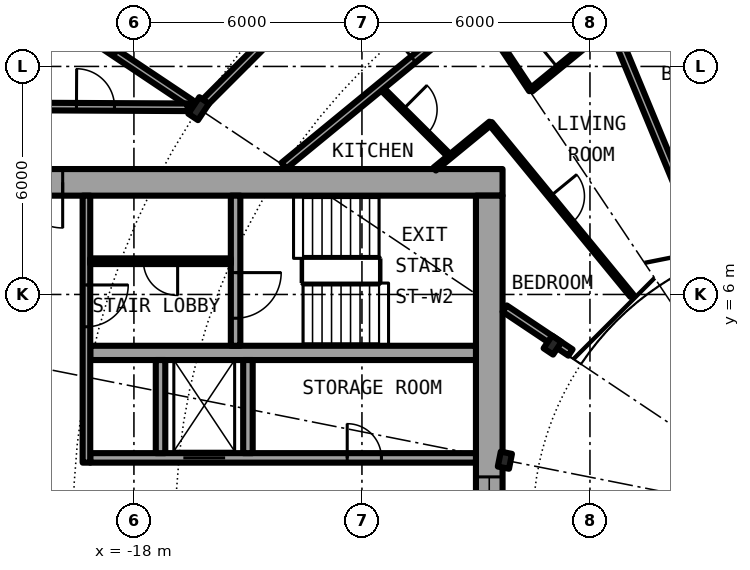
"""IFC4 building model, lengths in metres.
Left out: names, types, materials, properties, quantities, classifications, styles, units other than length and angle.
Written with IfcOpenShell. Run it as: python <this file> out.ifc"""

import sys

from ifc_helpers import new_model, si_unit, direction, frame, frame_2d, origin, origin_2d, place, context, subcontext, project, spatial, rectangle, i_section, extrude, element, fill, save


model = new_model("IFC4")
c1 = context("Model", 3, precision=1e-05, world=origin(), true_north=direction((0.0, 1.0)))
c2 = subcontext(c1, "Body", "Model", "MODEL_VIEW")
j1 = project(units=[si_unit("LENGTHUNIT", "METRE"), si_unit("PLANEANGLEUNIT", "RADIAN")], contexts=[c1])
p1 = place(None, origin())
s1 = spatial("IfcSite", under=j1, at=p1, CompositionType="ELEMENT")
p2 = place(p1, origin())
s2 = spatial("IfcBuilding", under=s1, at=p2, CompositionType="ELEMENT")
p3 = place(p2, frame((0.0, 0.0, 72.75)))
s3 = spatial("IfcBuildingStorey", under=s2, at=p3, CompositionType="ELEMENT", Elevation=72.75)
p4 = place(p3, frame((-16.297, 10.889, 0.0), z_axis=(0.0, 0.0, 1.0), x_axis=(-0.831469612303, 0.55557023302, 0.0)))
e1 = element("IfcColumn", 1, at=p4, inside=s3, PredefinedType="COLUMN", context=c2, shape_type="SweptSolid", body=[
    extrude(i_section(OverallWidth=0.306, OverallDepth=0.524, WebThickness=0.021, FlangeThickness=0.04, FilletRadius=0.027, at=origin_2d()), origin(), (0.0, 0.0, 1.0), 3.05),
])
for number, where, z_axis, x_axis in (
    (2, (-6.984, 4.667, 0.0), (0.0, 0.0, 1.0), (-0.831, 0.556, 0.0)),
    (3, (-8.239, 1.639, 0.0), (0.0, 0.0, 1.0), (-0.981, 0.195, 0.0)),
):
    element("IfcColumn", number, at=place(p3, frame(where, z_axis=z_axis, x_axis=x_axis)), inside=s3, PredefinedType="COLUMN", context=c2, shape_type="SweptSolid", body=[
        extrude(i_section(OverallWidth=0.3, OverallDepth=0.4, WebThickness=0.013, FlangeThickness=0.024, FilletRadius=0.027, at=origin_2d()), origin(), (0.0, 0.0, 1.0), 3.05),
    ])
p5 = place(p3, frame((-8.3, 8.95, 0.0), z_axis=(0.0, 0.0, 1.0), x_axis=(-1.0, 0.0, 0.0)))
e4 = element("IfcWall", 4, at=p5, inside=s3, PredefinedType="SHEAR", context=c2, shape_type="SweptSolid", body=[
    extrude(rectangle(XDim=14.0, YDim=0.7, at=frame_2d((7.0, 0.0))), origin(), (0.0, 0.0, 1.0), 3.05),
])
p6 = place(p5, frame((11.575, 0.0, 0.0)))
e5 = element("IfcOpeningElement", 5, at=p6, cuts=e4, PredefinedType="OPENING", context=c2, shape_type="SweptSolid", body=[
    extrude(rectangle(XDim=1.2, YDim=2.3, at=frame_2d((0.6, 1.15))), frame((0.0, 0.36, 0.0), z_axis=(0.0, -1.0, 0.0), x_axis=(1.0, 0.0, 0.0)), (0.0, 0.0, 1.0), 0.72),
])
p7 = place(p3, frame((-8.65, 8.6, 0.0), z_axis=(0.0, 0.0, 1.0), x_axis=(0.0, -1.0, 0.0)))
e6 = element("IfcWall", 6, at=p7, inside=s3, PredefinedType="SHEAR", context=c2, shape_type="SweptSolid", body=[
    extrude(rectangle(XDim=17.2, YDim=0.7, at=frame_2d((8.6, 0.0))), origin(), (0.0, 0.0, 1.0), 3.05),
])
p8 = place(p7, frame((7.4, 0.0, 0.1)))
e7 = element("IfcOpeningElement", 7, at=p8, cuts=e6, PredefinedType="OPENING", context=c2, shape_type="SweptSolid", body=[
    extrude(rectangle(XDim=2.4, YDim=2.2, at=frame_2d((1.2, 1.1))), frame((0.0, 0.36, 0.0), z_axis=(0.0, -1.0, 0.0), x_axis=(1.0, 0.0, 0.0)), (0.0, 0.0, 1.0), 0.72),
])
p9 = place(p3, frame((-19.15, 1.7, 0.0), z_axis=(0.0, 0.0, 1.0), x_axis=(1.0, 0.0, 0.0)))
e8 = element("IfcWall", 8, at=p9, inside=s3, PredefinedType="SHEAR", context=c2, shape_type="SweptSolid", body=[
    extrude(rectangle(XDim=10.15, YDim=0.25, at=frame_2d((5.075, 0.0))), origin(), (0.0, 0.0, 1.0), 3.05),
])
p10 = place(p9, frame((2.45, 0.0, 0.0)))
e9 = element("IfcOpeningElement", 9, at=p10, cuts=e8, PredefinedType="OPENING", context=c2, shape_type="SweptSolid", body=[
    extrude(rectangle(XDim=1.1, YDim=2.3, at=frame_2d((0.55, 1.15))), frame((0.0, 0.135, 0.0), z_axis=(0.0, -1.0, 0.0), x_axis=(1.0, 0.0, 0.0)), (0.0, 0.0, 1.0), 0.27),
])
p11 = place(p9, frame((6.762, 0.0, 0.0)))
e10 = element("IfcOpeningElement", 10, at=p11, cuts=e8, PredefinedType="OPENING", context=c2, shape_type="SweptSolid", body=[
    extrude(rectangle(XDim=0.9, YDim=2.3, at=frame_2d((0.45, 1.15))), frame((0.0, 0.135, 0.0), z_axis=(0.0, -1.0, 0.0), x_axis=(1.0, 0.0, 0.0)), (0.0, 0.0, 1.0), 0.27),
])
p12 = place(p3, frame((-9.0, 4.462, 0.0), z_axis=(0.0, 0.0, 1.0), x_axis=(-1.0, 0.0, 0.0)))
e11 = element("IfcWall", 11, at=p12, inside=s3, PredefinedType="SHEAR", context=c2, shape_type="SweptSolid", body=[
    extrude(rectangle(XDim=10.15, YDim=0.375, at=frame_2d((5.075, 0.0))), origin(), (0.0, 0.0, 1.0), 3.05),
])
p13 = place(p3, frame((-15.325, 8.6, 0.0), z_axis=(0.0, 0.0, 1.0), x_axis=(0.0, -1.0, 0.0)))
e12 = element("IfcWall", 12, at=p13, inside=s3, PredefinedType="SHEAR", context=c2, shape_type="SweptSolid", body=[
    extrude(rectangle(XDim=3.95, YDim=0.25, at=frame_2d((1.975, 0.0))), origin(), (0.0, 0.0, 1.0), 3.05),
])
p14 = place(p13, frame((2.025, 0.0, 0.0)))
e13 = element("IfcOpeningElement", 13, at=p14, cuts=e12, PredefinedType="OPENING", context=c2, shape_type="SweptSolid", body=[
    extrude(rectangle(XDim=1.2, YDim=2.3, at=frame_2d((0.6, 1.15))), frame((0.0, 0.135, 0.0), z_axis=(0.0, -1.0, 0.0), x_axis=(1.0, 0.0, 0.0)), (0.0, 0.0, 1.0), 0.27),
])
for number, where, z_axis, x_axis in (
    (14, (-15.0, 1.825, 0.0), (0.0, 0.0, 1.0), (0.0, 1.0, 0.0)),
    (15, (-17.3, 1.825, 0.0), (0.0, 0.0, 1.0), (0.0, 1.0, 0.0)),
):
    element("IfcWall", number, at=place(p3, frame(where, z_axis=z_axis, x_axis=x_axis)), inside=s3, PredefinedType="SOLIDWALL", context=c2, shape_type="SweptSolid", body=[
        extrude(rectangle(XDim=2.45, YDim=0.25, at=frame_2d((1.225, 0.0))), origin(), (0.0, 0.0, 1.0), 2.7),
    ])
p15 = place(p3, frame((-19.25, 8.6, 0.0), z_axis=(0.0, 0.0, 1.0), x_axis=(0.0, -1.0, 0.0)))
e16 = element("IfcWall", 16, at=p15, inside=s3, PredefinedType="SOLIDWALL", context=c2, shape_type="SweptSolid", body=[
    extrude(rectangle(XDim=7.025, YDim=0.2, at=frame_2d((3.513, 0.0))), origin(), (0.0, 0.0, 1.0), 2.7),
])
p16 = place(p15, frame((2.35, 0.0, 0.0)))
e17 = element("IfcOpeningElement", 17, at=p16, cuts=e16, PredefinedType="OPENING", context=c2, shape_type="SweptSolid", body=[
    extrude(rectangle(XDim=1.1, YDim=2.3, at=frame_2d((0.55, 1.15))), frame((0.0, 0.11, 0.0), z_axis=(0.0, -1.0, 0.0), x_axis=(1.0, 0.0, 0.0)), (0.0, 0.0, 1.0), 0.22),
])
p17 = place(p3, frame((-15.45, 6.875, 0.0), z_axis=(0.0, 0.0, 1.0), x_axis=(-1.0, 0.0, 0.0)))
e18 = element("IfcWall", 18, at=p17, inside=s3, PredefinedType="PARTITIONING", context=c2, shape_type="SweptSolid", body=[
    extrude(rectangle(XDim=3.7, YDim=0.15, at=frame_2d((1.85, 0.0))), origin(), (0.0, 0.0, 1.0), 2.7),
])
p18 = place(p17, frame((1.4, 0.0, 0.0)))
e19 = element("IfcOpeningElement", 19, at=p18, cuts=e18, PredefinedType="OPENING", context=c2, shape_type="SweptSolid", body=[
    extrude(rectangle(XDim=0.9, YDim=2.3, at=frame_2d((0.45, 1.15))), frame((0.0, 0.085, 0.0), z_axis=(0.0, -1.0, 0.0), x_axis=(1.0, 0.0, 0.0)), (0.0, 0.0, 1.0), 0.17),
])
p19 = place(p3, frame((-22.595, 15.098, 0.0), z_axis=(0.0, 0.0, 1.0), x_axis=(0.831382022135, -0.555701298605, 0.0)))
e20 = element("IfcWall", 20, at=p19, inside=s3, PredefinedType="PARTITIONING", context=c2, shape_type="SweptSolid", body=[
    extrude(rectangle(XDim=7.313, YDim=0.2, at=frame_2d((3.657, 0.0))), origin(), (0.0, 0.0, 1.0), 2.7),
])
p20 = place(p3, frame((-11.524, 11.464, 0.0), z_axis=(0.0, 0.0, 1.0), x_axis=(0.708796844581, -0.705412668665, 0.0)))
e21 = element("IfcWall", 21, at=p20, inside=s3, PredefinedType="PARTITIONING", context=c2, shape_type="SweptSolid", body=[
    extrude(rectangle(XDim=2.597, YDim=0.1, at=frame_2d((1.299, 0.0))), origin(), (0.0, 0.0, 1.0), 2.7),
])
p21 = place(p20, frame((0.849, 0.0, 0.0)))
e22 = element("IfcOpeningElement", 22, at=p21, cuts=e21, PredefinedType="OPENING", context=c2, shape_type="SweptSolid", body=[
    extrude(rectangle(XDim=0.9, YDim=2.3, at=frame_2d((0.45, 1.15))), frame((0.0, 0.06, 0.0), z_axis=(0.0, -1.0, 0.0), x_axis=(1.0, 0.0, 0.0)), (0.0, 0.0, 1.0), 0.12),
])
p22 = place(p3, frame((-8.996, 13.539, 0.0), z_axis=(0.0, 0.0, 1.0), x_axis=(0.553615197403, -0.83277260594, 0.0)))
e23 = element("IfcWall", 23, at=p22, inside=s3, PredefinedType="PARTITIONING", context=c2, shape_type="SweptSolid", body=[
    extrude(rectangle(XDim=2.597, YDim=0.1, at=frame_2d((1.299, 0.0))), origin(), (0.0, 0.0, 1.0), 2.7),
])
p23 = place(p3, frame((-8.62, 10.504, 0.0), z_axis=(0.0, 0.0, 1.0), x_axis=(0.634358693064, -0.773038840249, 0.0)))
e24 = element("IfcWall", 24, at=p23, inside=s3, PredefinedType="PARTITIONING", context=c2, shape_type="SweptSolid", body=[
    extrude(rectangle(XDim=5.868, YDim=0.1, at=frame_2d((2.934, 0.0))), origin(), (0.0, 0.0, 1.0), 2.7),
])
p24 = place(p23, frame((2.484, 0.0, 0.0)))
e25 = element("IfcOpeningElement", 25, at=p24, cuts=e24, PredefinedType="OPENING", context=c2, shape_type="SweptSolid", body=[
    extrude(rectangle(XDim=0.9, YDim=2.3, at=frame_2d((0.45, 1.15))), frame((0.0, 0.06, 0.0), z_axis=(0.0, -1.0, 0.0), x_axis=(1.0, 0.0, 0.0)), (0.0, 0.0, 1.0), 0.12),
])
p25 = place(p3, frame((-6.468, 15.614, 0.0), z_axis=(0.0, 0.0, 1.0), x_axis=(0.382646942224, -0.923894646378, 0.0)))
e26 = element("IfcWall", 26, at=p25, inside=s3, PredefinedType="PARTITIONING", context=c2, shape_type="SweptSolid", body=[
    extrude(rectangle(XDim=9.181, YDim=0.2, at=frame_2d((4.59, 0.0))), origin(), (0.0, 0.0, 1.0), 2.7),
])
p26 = place(p3, frame((-6.513, 4.472, 0.0), z_axis=(0.0, 0.0, 1.0), x_axis=(-0.831382204863, 0.555701025225, 0.0)))
e27 = element("IfcWall", 27, at=p26, inside=s3, PredefinedType="PARTITIONING", context=c2, shape_type="SweptSolid", body=[
    extrude(rectangle(XDim=2.082, YDim=0.2, at=frame_2d((1.041, 0.0))), origin(), (0.0, 0.0, 1.0), 2.7),
])
p27 = place(p3, frame((-21.675, 10.95, 0.0), z_axis=(0.0, 0.0, 1.0), x_axis=(0.999988019025, -0.004895079807, 0.0)))
e28 = element("IfcWall", 28, at=p27, inside=s3, PredefinedType="PARTITIONING", context=c2, shape_type="SweptSolid", body=[
    extrude(rectangle(XDim=5.087, YDim=0.2, at=frame_2d((2.543, 0.0))), origin(), (0.0, 0.0, 1.0), 2.7),
])
p28 = place(p27, frame((2.163, 0.0, 0.0)))
e29 = element("IfcOpeningElement", 29, at=p28, cuts=e28, PredefinedType="OPENING", context=c2, shape_type="SweptSolid", body=[
    extrude(rectangle(XDim=1.0, YDim=2.3, at=frame_2d((0.5, 1.15))), frame((0.0, 0.11, 0.0), z_axis=(0.0, -1.0, 0.0), x_axis=(1.0, 0.0, 0.0)), (0.0, 0.0, 1.0), 0.22),
])
p29 = place(p3, frame((-10.087, 9.3, 0.0), z_axis=(0.0, 0.0, 1.0), x_axis=(0.772957368531, 0.6344579627, 0.0)))
e30 = element("IfcWall", 30, at=p29, inside=s3, PredefinedType="PARTITIONING", context=c2, shape_type="SweptSolid", body=[
    extrude(rectangle(XDim=1.906, YDim=0.1, at=frame_2d((0.953, 0.0))), origin(), (0.0, 0.0, 1.0), 2.7),
])
p30 = place(p3, frame((-7.552, 11.379, 0.0), z_axis=(0.0, 0.0, 1.0), x_axis=(0.773323547924, 0.634011585246, 0.0)))
e31 = element("IfcWall", 31, at=p30, inside=s3, PredefinedType="PARTITIONING", context=c2, shape_type="SweptSolid", body=[
    extrude(rectangle(XDim=2.748, YDim=0.1, at=frame_2d((1.374, 0.0))), origin(), (0.0, 0.0, 1.0), 2.7),
])
p31 = place(p30, frame((0.917, 0.0, 0.0)))
e32 = element("IfcOpeningElement", 32, at=p31, cuts=e31, PredefinedType="OPENING", context=c2, shape_type="SweptSolid", body=[
    extrude(rectangle(XDim=0.9, YDim=2.3, at=frame_2d((0.45, 1.15))), frame((0.0, 0.06, 0.0), z_axis=(0.0, -1.0, 0.0), x_axis=(1.0, 0.0, 0.0)), (0.0, 0.0, 1.0), 0.12),
])
p32 = place(p3, frame((-14.052, 9.389, 0.0), z_axis=(0.0, 0.0, 1.0), x_axis=(0.77292501819, 0.634497372931, 0.0)))
e33 = element("IfcWall", 33, at=p32, inside=s3, PredefinedType="PARTITIONING", context=c2, shape_type="SweptSolid", body=[
    extrude(rectangle(XDim=9.81, YDim=0.2, at=frame_2d((4.905, 0.0))), origin(), (0.0, 0.0, 1.0), 2.7),
])
p33 = place(p32, frame((4.406, 0.0, 0.0)))
e34 = element("IfcOpeningElement", 34, at=p33, cuts=e33, PredefinedType="OPENING", context=c2, shape_type="SweptSolid", body=[
    extrude(rectangle(XDim=1.0, YDim=2.3, at=frame_2d((0.5, 1.15))), frame((0.0, 0.11, 0.0), z_axis=(0.0, -1.0, 0.0), x_axis=(1.0, 0.0, 0.0)), (0.0, 0.0, 1.0), 0.22),
])
p34 = place(p3, frame((-16.186, 11.0, 0.0), z_axis=(0.0, 0.0, 1.0), x_axis=(0.707106781187, 0.707106781187, 0.0)))
e35 = element("IfcWall", 35, at=p34, inside=s3, PredefinedType="PARTITIONING", context=c2, shape_type="SweptSolid", body=[
    extrude(rectangle(XDim=7.334, YDim=0.2, at=frame_2d((3.667, 0.0))), origin(), (0.0, 0.0, 1.0), 2.38),
])
p35 = place(p34, frame((2.211, 0.0, 0.0)))
e36 = element("IfcOpeningElement", 36, at=p35, cuts=e35, PredefinedType="OPENING", context=c2, shape_type="SweptSolid", body=[
    extrude(rectangle(XDim=1.0, YDim=2.3, at=frame_2d((0.5, 1.15))), frame((0.0, 0.11, 0.0), z_axis=(0.0, -1.0, 0.0), x_axis=(1.0, 0.0, 0.0)), (0.0, 0.0, 1.0), 0.22),
])
p36 = place(p3, frame((-18.542, 12.389, 0.0), z_axis=(0.0, 0.0, 1.0), x_axis=(0.707190945535, 0.707022606819, 0.0)))
e37 = element("IfcWall", 37, at=p36, inside=s3, PredefinedType="PARTITIONING", context=c2, shape_type="SweptSolid", body=[
    extrude(rectangle(XDim=4.351, YDim=0.1, at=frame_2d((2.175, 0.0))), origin(), (0.0, 0.0, 1.0), 2.7),
])
p37 = place(p36, frame((0.639, 0.0, 0.0)))
e38 = element("IfcOpeningElement", 38, at=p37, cuts=e37, PredefinedType="OPENING", context=c2, shape_type="SweptSolid", body=[
    extrude(rectangle(XDim=0.9, YDim=2.3, at=frame_2d((0.45, 1.15))), frame((0.0, 0.06, 0.0), z_axis=(0.0, -1.0, 0.0), x_axis=(1.0, 0.0, 0.0)), (0.0, 0.0, 1.0), 0.12),
])
p38 = place(p10, origin())
e39 = element("IfcDoor", 39, at=p38, inside=s3, OperationType="DOUBLE_DOOR_SLIDING", PredefinedType="DOOR", context=c2, shape_type="SweptSolid", body=[
    extrude(rectangle(XDim=1.1, YDim=2.3, at=frame_2d((0.55, 1.15))), frame((0.0, 0.025, 0.0), z_axis=(0.0, -1.0, 0.0), x_axis=(1.0, 0.0, 0.0)), (0.0, 0.0, 1.0), 0.05),
])
fill(e9, e39)
p39 = place(p11, origin())
e40 = element("IfcDoor", 40, at=p39, inside=s3, OperationType="SINGLE_SWING_LEFT", PredefinedType="DOOR", context=c2, shape_type="SweptSolid", body=[
    extrude(rectangle(XDim=0.9, YDim=2.3, at=frame_2d((0.45, 1.15))), frame((0.0, 0.025, 0.0), z_axis=(0.0, -1.0, 0.0), x_axis=(1.0, 0.0, 0.0)), (0.0, 0.0, 1.0), 0.05),
])
fill(e10, e40)
p40 = place(p18, origin())
e41 = element("IfcDoor", 41, at=p40, inside=s3, OperationType="SINGLE_SWING_LEFT", PredefinedType="DOOR", context=c2, shape_type="SweptSolid", body=[
    extrude(rectangle(XDim=0.9, YDim=2.3, at=frame_2d((0.45, 1.15))), frame((0.0, 0.025, 0.0), z_axis=(0.0, -1.0, 0.0), x_axis=(1.0, 0.0, 0.0)), (0.0, 0.0, 1.0), 0.05),
])
fill(e19, e41)
p41 = place(p14, origin())
e42 = element("IfcDoor", 42, at=p41, inside=s3, OperationType="SINGLE_SWING_LEFT", PredefinedType="DOOR", context=c2, shape_type="SweptSolid", body=[
    extrude(rectangle(XDim=1.2, YDim=2.3, at=frame_2d((0.6, 1.15))), frame((0.0, 0.025, 0.0), z_axis=(0.0, -1.0, 0.0), x_axis=(1.0, 0.0, 0.0)), (0.0, 0.0, 1.0), 0.05),
])
fill(e13, e42)
p42 = place(p16, origin())
e43 = element("IfcDoor", 43, at=p42, inside=s3, OperationType="SINGLE_SWING_RIGHT", PredefinedType="DOOR", context=c2, shape_type="SweptSolid", body=[
    extrude(rectangle(XDim=1.1, YDim=2.3, at=frame_2d((0.55, 1.15))), frame((0.0, 0.025, 0.0), z_axis=(0.0, -1.0, 0.0), x_axis=(1.0, 0.0, 0.0)), (0.0, 0.0, 1.0), 0.05),
])
fill(e17, e43)
p43 = place(p6, origin())
e44 = element("IfcDoor", 44, at=p43, inside=s3, OperationType="SINGLE_SWING_LEFT", PredefinedType="DOOR", context=c2, shape_type="SweptSolid", body=[
    extrude(rectangle(XDim=1.2, YDim=2.3, at=frame_2d((0.6, 1.15))), frame((0.0, 0.025, 0.0), z_axis=(0.0, -1.0, 0.0), x_axis=(1.0, 0.0, 0.0)), (0.0, 0.0, 1.0), 0.05),
])
fill(e5, e44)
p44 = place(p8, origin())
e45 = element("IfcWindow", 45, at=p44, inside=s3, PartitioningType="SINGLE_PANEL", PredefinedType="WINDOW", context=c2, shape_type="SweptSolid", body=[
    extrude(rectangle(XDim=2.4, YDim=2.2, at=frame_2d((1.2, 1.1))), frame((0.0, 0.03, 0.0), z_axis=(0.0, -1.0, 0.0), x_axis=(1.0, 0.0, 0.0)), (0.0, 0.0, 1.0), 0.06),
])
fill(e7, e45)
p45 = place(p33, origin())
e46 = element("IfcDoor", 46, at=p45, inside=s3, OperationType="SINGLE_SWING_RIGHT", PredefinedType="DOOR", context=c2, shape_type="SweptSolid", body=[
    extrude(rectangle(XDim=1.0, YDim=2.3, at=frame_2d((0.5, 1.15))), frame((0.0, 0.025, 0.0), z_axis=(0.0, -1.0, 0.0), x_axis=(1.0, 0.0, 0.0)), (0.0, 0.0, 1.0), 0.05),
])
fill(e34, e46)
p46 = place(p31, origin())
e47 = element("IfcDoor", 47, at=p46, inside=s3, OperationType="SINGLE_SWING_LEFT", PredefinedType="DOOR", context=c2, shape_type="SweptSolid", body=[
    extrude(rectangle(XDim=0.9, YDim=2.3, at=frame_2d((0.45, 1.15))), frame((0.0, 0.025, 0.0), z_axis=(0.0, -1.0, 0.0), x_axis=(1.0, 0.0, 0.0)), (0.0, 0.0, 1.0), 0.05),
])
fill(e32, e47)
p47 = place(p21, origin())
e48 = element("IfcDoor", 48, at=p47, inside=s3, OperationType="SINGLE_SWING_RIGHT", PredefinedType="DOOR", context=c2, shape_type="SweptSolid", body=[
    extrude(rectangle(XDim=0.9, YDim=2.3, at=frame_2d((0.45, 1.15))), frame((0.0, 0.025, 0.0), z_axis=(0.0, -1.0, 0.0), x_axis=(1.0, 0.0, 0.0)), (0.0, 0.0, 1.0), 0.05),
])
fill(e22, e48)
p48 = place(p24, origin())
e49 = element("IfcDoor", 49, at=p48, inside=s3, OperationType="SINGLE_SWING_RIGHT", PredefinedType="DOOR", context=c2, shape_type="SweptSolid", body=[
    extrude(rectangle(XDim=0.9, YDim=2.3, at=frame_2d((0.45, 1.15))), frame((0.0, 0.025, 0.0), z_axis=(0.0, -1.0, 0.0), x_axis=(1.0, 0.0, 0.0)), (0.0, 0.0, 1.0), 0.05),
])
fill(e25, e49)
p49 = place(p28, origin())
e50 = element("IfcDoor", 50, at=p49, inside=s3, OperationType="SINGLE_SWING_RIGHT", PredefinedType="DOOR", context=c2, shape_type="SweptSolid", body=[
    extrude(rectangle(XDim=1.0, YDim=2.3, at=frame_2d((0.5, 1.15))), frame((0.0, 0.025, 0.0), z_axis=(0.0, -1.0, 0.0), x_axis=(1.0, 0.0, 0.0)), (0.0, 0.0, 1.0), 0.05),
])
fill(e29, e50)
save(model, sys.argv[1])
